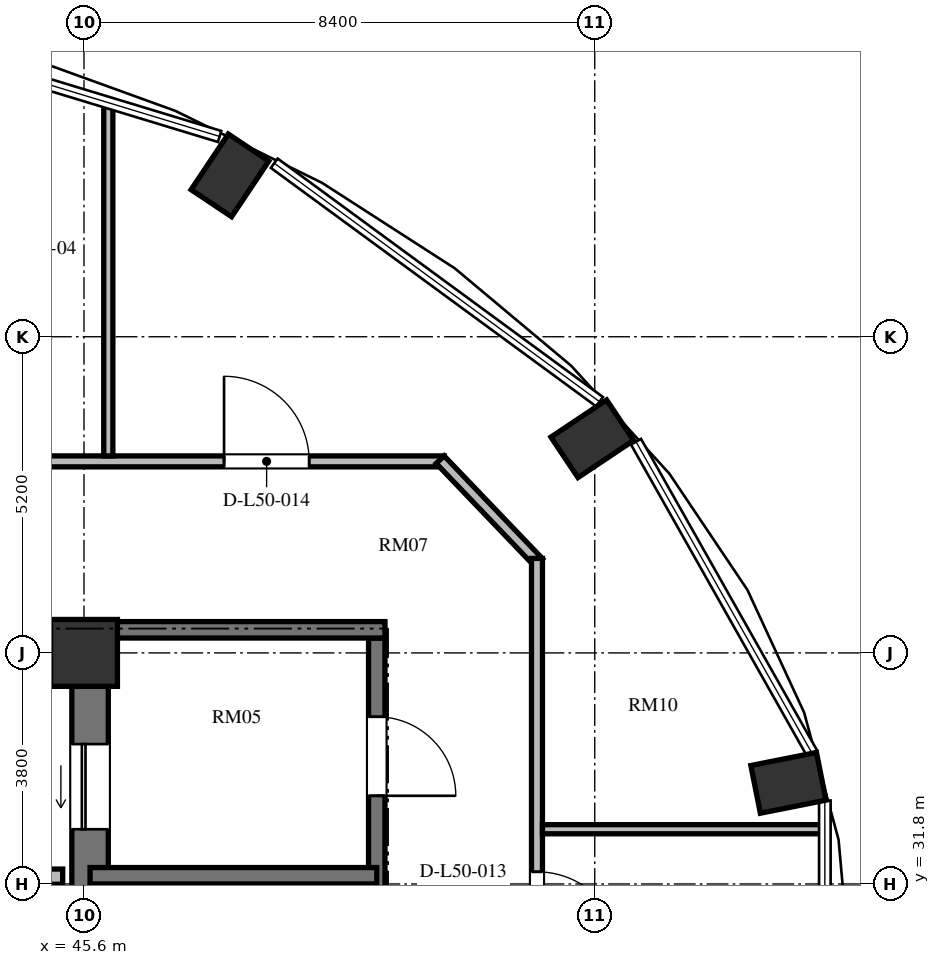
"""IFC4 building model, lengths in metres.
Left out: names, types, materials, properties, quantities, classifications, styles, units other than length and angle.
Written with IfcOpenShell. Run it as: python <this file> out.ifc"""

import sys

from ifc_helpers import new_model, si_unit, direction, frame, frame_2d, origin, origin_2d, place, context, subcontext, project, spatial, rectangle, extrude, element, fill, save


model = new_model("IFC4")
c1 = context("Model", 3, precision=1e-05, world=origin(), true_north=direction((0.0, 1.0)))
c2 = subcontext(c1, "Body", "Model", "MODEL_VIEW")
j1 = project(units=[si_unit("LENGTHUNIT", "METRE"), si_unit("PLANEANGLEUNIT", "RADIAN")], contexts=[c1])
p1 = place(None, origin())
s1 = spatial("IfcSite", under=j1, at=p1, CompositionType="ELEMENT")
p2 = place(p1, origin())
s2 = spatial("IfcBuilding", under=s1, at=p2, CompositionType="ELEMENT")
p3 = place(p2, frame((0.0, 0.0, 194.832)))
s3 = spatial("IfcBuildingStorey", under=s2, at=p3, CompositionType="ELEMENT", Elevation=194.832)
for number, where, z_axis, x_axis in (
    (1, (57.185, 33.463, 0.0), (0.0, 0.0, 1.0), (0.981, 0.195, 0.0)),
    (2, (53.96, 39.123, 0.0), (0.0, 0.0, 1.0), (0.831, 0.556, 0.0)),
    (3, (48.0, 43.454, 0.0), (0.0, 0.0, 1.0), (0.556, 0.831, 0.0)),
):
    element("IfcColumn", number, at=place(p3, frame(where, z_axis=z_axis, x_axis=x_axis)), inside=s3, PredefinedType="COLUMN", context=c2, shape_type="SweptSolid", body=[
        extrude(rectangle(XDim=1.1, YDim=0.8, at=origin_2d()), origin(), (0.0, 0.0, 1.0), 3.648),
    ])
p4 = place(p3, frame((45.6, 35.6, 0.0), z_axis=(0.0, 0.0, 1.0), x_axis=(1.0, 0.0, 0.0)))
e4 = element("IfcColumn", 4, at=p4, inside=s3, PredefinedType="COLUMN", context=c2, shape_type="SweptSolid", body=[
    extrude(rectangle(XDim=1.1, YDim=1.1, at=origin_2d()), origin(), (0.0, 0.0, 1.0), 3.648),
])
p5 = place(p3, frame((45.7, 20.95, 0.0), z_axis=(0.0, 0.0, 1.0), x_axis=(0.0, 1.0, 0.0)))
e5 = element("IfcWall", 5, at=p5, inside=s3, PredefinedType="SHEAR", context=c2, shape_type="SweptSolid", body=[
    extrude(rectangle(XDim=14.1, YDim=0.6, at=frame_2d((7.05, 0.0))), origin(), (0.0, 0.0, 1.0), 3.648),
])
p6 = place(p5, frame((11.75, 0.0, 0.0)))
e6 = element("IfcOpeningElement", 6, at=p6, cuts=e5, PredefinedType="OPENING", context=c2, shape_type="SweptSolid", body=[
    extrude(rectangle(XDim=1.4, YDim=2.3, at=frame_2d((0.7, 1.15))), frame((0.0, 0.31, 0.0), z_axis=(0.0, -1.0, 0.0), x_axis=(1.0, 0.0, 0.0)), (0.0, 0.0, 1.0), 0.62),
])
p7 = place(p5, frame((0.95, 0.0, 0.0)))
e7 = element("IfcOpeningElement", 7, at=p7, cuts=e5, PredefinedType="OPENING", context=c2, shape_type="SweptSolid", body=[
    extrude(rectangle(XDim=1.4, YDim=2.3, at=frame_2d((0.7, 1.15))), frame((0.0, 0.31, 0.0), z_axis=(0.0, -1.0, 0.0), x_axis=(1.0, 0.0, 0.0)), (0.0, 0.0, 1.0), 0.62),
])
p8 = place(p3, frame((42.95, 31.92, 0.0), z_axis=(0.0, 0.0, 1.0), x_axis=(1.0, 0.0, 0.0)))
e8 = element("IfcWall", 8, at=p8, inside=s3, PredefinedType="SOLIDWALL", context=c2, shape_type="SweptSolid", body=[
    extrude(rectangle(XDim=2.3, YDim=0.25, at=frame_2d((1.15, 0.0))), origin(), (0.0, 0.0, 1.0), 3.448),
])
p9 = place(p3, frame((50.415, 35.845, 0.0), z_axis=(0.0, 0.0, 1.0), x_axis=(0.0, -1.0, 0.0)))
e9 = element("IfcWall", 9, at=p9, inside=s3, PredefinedType="SHEAR", context=c2, shape_type="SweptSolid", body=[
    extrude(rectangle(XDim=15.825, YDim=0.27, at=frame_2d((7.913, 0.0))), origin(), (0.0, 0.0, 1.0), 3.648),
])
p10 = place(p9, frame((4.445, 0.0, 0.0)))
e10 = element("IfcOpeningElement", 10, at=p10, cuts=e9, PredefinedType="OPENING", context=c2, shape_type="SweptSolid", body=[
    extrude(rectangle(XDim=1.2, YDim=2.15, at=frame_2d((0.6, 1.075))), frame((0.0, 0.145, 0.0), z_axis=(0.0, -1.0, 0.0), x_axis=(1.0, 0.0, 0.0)), (0.0, 0.0, 1.0), 0.29),
])
p11 = place(p9, frame((1.295, 0.0, 0.0)))
e11 = element("IfcOpeningElement", 11, at=p11, cuts=e9, PredefinedType="OPENING", context=c2, shape_type="SweptSolid", body=[
    extrude(rectangle(XDim=1.3, YDim=2.2, at=frame_2d((0.65, 1.1))), frame((0.0, 0.145, 0.0), z_axis=(0.0, -1.0, 0.0), x_axis=(1.0, 0.0, 0.0)), (0.0, 0.0, 1.0), 0.29),
])
p12 = place(p9, frame((13.095, 0.0, 0.0)))
e12 = element("IfcOpeningElement", 12, at=p12, cuts=e9, PredefinedType="OPENING", context=c2, shape_type="SweptSolid", body=[
    extrude(rectangle(XDim=1.3, YDim=2.2, at=frame_2d((0.65, 1.1))), frame((0.0, 0.145, 0.0), z_axis=(0.0, -1.0, 0.0), x_axis=(1.0, 0.0, 0.0)), (0.0, 0.0, 1.0), 0.29),
])
p13 = place(p3, frame((46.0, 35.98, 0.0), z_axis=(0.0, 0.0, 1.0), x_axis=(1.0, 0.0, 0.0)))
e13 = element("IfcWall", 13, at=p13, inside=s3, PredefinedType="SHEAR", context=c2, shape_type="SweptSolid", body=[
    extrude(rectangle(XDim=4.55, YDim=0.27, at=frame_2d((2.275, 0.0))), origin(), (0.0, 0.0, 1.0), 3.648),
])
p14 = place(p3, frame((45.7, 31.935, 0.0), z_axis=(0.0, 0.0, 1.0), x_axis=(1.0, 0.0, 0.0)))
e14 = element("IfcWall", 14, at=p14, inside=s3, PredefinedType="SHEAR", context=c2, shape_type="SweptSolid", body=[
    extrude(rectangle(XDim=4.715, YDim=0.27, at=frame_2d((2.357, 0.0))), origin(), (0.0, 0.0, 1.0), 3.648),
])
p15 = place(p3, frame((30.71, 38.75, 0.0), z_axis=(0.0, 0.0, 1.0), x_axis=(1.0, 0.0, 0.0)))
e15 = element("IfcWall", 15, at=p15, inside=s3, PredefinedType="PARTITIONING", context=c2, shape_type="SweptSolid", body=[
    extrude(rectangle(XDim=20.815, YDim=0.18, at=frame_2d((10.408, 0.0))), origin(), (0.0, 0.0, 1.0), 3.073),
])
p16 = place(p15, frame((17.194, 0.0, 0.0)))
e16 = element("IfcOpeningElement", 16, at=p16, cuts=e15, PredefinedType="OPENING", context=c2, shape_type="SweptSolid", body=[
    extrude(rectangle(XDim=1.4, YDim=2.2, at=frame_2d((0.7, 1.1))), frame((0.0, 0.1, 0.0), z_axis=(0.0, -1.0, 0.0), x_axis=(1.0, 0.0, 0.0)), (0.0, 0.0, 1.0), 0.2),
])
p17 = place(p15, frame((12.59, 0.0, 0.0)))
e17 = element("IfcOpeningElement", 17, at=p17, cuts=e15, PredefinedType="OPENING", context=c2, shape_type="SweptSolid", body=[
    extrude(rectangle(XDim=1.4, YDim=2.2, at=frame_2d((0.7, 1.1))), frame((0.0, 0.1, 0.0), z_axis=(0.0, -1.0, 0.0), x_axis=(1.0, 0.0, 0.0)), (0.0, 0.0, 1.0), 0.2),
])
p18 = place(p15, frame((8.59, 0.0, 0.0)))
e18 = element("IfcOpeningElement", 18, at=p18, cuts=e15, PredefinedType="OPENING", context=c2, shape_type="SweptSolid", body=[
    extrude(rectangle(XDim=1.4, YDim=2.2, at=frame_2d((0.7, 1.1))), frame((0.0, 0.1, 0.0), z_axis=(0.0, -1.0, 0.0), x_axis=(1.0, 0.0, 0.0)), (0.0, 0.0, 1.0), 0.2),
])
p19 = place(p15, frame((4.59, 0.0, 0.0)))
e19 = element("IfcOpeningElement", 19, at=p19, cuts=e15, PredefinedType="OPENING", context=c2, shape_type="SweptSolid", body=[
    extrude(rectangle(XDim=1.4, YDim=2.2, at=frame_2d((0.7, 1.1))), frame((0.0, 0.1, 0.0), z_axis=(0.0, -1.0, 0.0), x_axis=(1.0, 0.0, 0.0)), (0.0, 0.0, 1.0), 0.2),
])
p20 = place(p15, frame((1.104, 0.0, 0.0)))
e20 = element("IfcOpeningElement", 20, at=p20, cuts=e15, PredefinedType="OPENING", context=c2, shape_type="SweptSolid", body=[
    extrude(rectangle(XDim=1.4, YDim=2.2, at=frame_2d((0.7, 1.1))), frame((0.0, 0.1, 0.0), z_axis=(0.0, -1.0, 0.0), x_axis=(1.0, 0.0, 0.0)), (0.0, 0.0, 1.0), 0.2),
])
p21 = place(p3, frame((51.458, 38.779, 0.0), z_axis=(0.0, 0.0, 1.0), x_axis=(0.691359830363, -0.722510612352, 0.0)))
e21 = element("IfcWall", 21, at=p21, inside=s3, PredefinedType="PARTITIONING", context=c2, shape_type="SweptSolid", body=[
    extrude(rectangle(XDim=2.343, YDim=0.18, at=frame_2d((1.172, 0.0))), origin(), (0.0, 0.0, 1.0), 3.033),
])
p22 = place(p3, frame((53.05, 37.155, 0.0), z_axis=(0.0, 0.0, 1.0), x_axis=(0.0, -1.0, 0.0)))
e22 = element("IfcWall", 22, at=p22, inside=s3, PredefinedType="PARTITIONING", context=c2, shape_type="SweptSolid", body=[
    extrude(rectangle(XDim=13.509, YDim=0.18, at=frame_2d((6.754, 0.0))), origin(), (0.0, 0.0, 1.0), 3.448),
])
p23 = place(p22, frame((10.758, 0.0, 0.0)))
e23 = element("IfcOpeningElement", 23, at=p23, cuts=e22, PredefinedType="OPENING", context=c2, shape_type="SweptSolid", body=[
    extrude(rectangle(XDim=1.4, YDim=2.2, at=frame_2d((0.7, 1.1))), frame((0.0, 0.1, 0.0), z_axis=(0.0, -1.0, 0.0), x_axis=(1.0, 0.0, 0.0)), (0.0, 0.0, 1.0), 0.2),
])
p24 = place(p22, frame((8.133, 0.0, 0.0)))
e24 = element("IfcOpeningElement", 24, at=p24, cuts=e22, PredefinedType="OPENING", context=c2, shape_type="SweptSolid", body=[
    extrude(rectangle(XDim=1.05, YDim=2.15, at=frame_2d((0.525, 1.075))), frame((0.0, 0.1, 0.0), z_axis=(0.0, -1.0, 0.0), x_axis=(1.0, 0.0, 0.0)), (0.0, 0.0, 1.0), 0.2),
])
p25 = place(p22, frame((5.155, 0.0, 0.0)))
e25 = element("IfcOpeningElement", 25, at=p25, cuts=e22, PredefinedType="OPENING", context=c2, shape_type="SweptSolid", body=[
    extrude(rectangle(XDim=1.4, YDim=2.2, at=frame_2d((0.7, 1.1))), frame((0.0, 0.1, 0.0), z_axis=(0.0, -1.0, 0.0), x_axis=(1.0, 0.0, 0.0)), (0.0, 0.0, 1.0), 0.2),
])
p26 = place(p3, frame((53.14, 32.7, 0.0), z_axis=(0.0, 0.0, 1.0), x_axis=(1.0, 0.0, 0.0)))
e26 = element("IfcWall", 26, at=p26, inside=s3, PredefinedType="PARTITIONING", context=c2, shape_type="SweptSolid", body=[
    extrude(rectangle(XDim=4.632, YDim=0.15, at=frame_2d((2.316, 0.0))), origin(), (0.0, 0.0, 1.0), 3.448),
])
p27 = place(p3, frame((46.0, 38.84, 0.0), z_axis=(0.0, 0.0, 1.0), x_axis=(0.0, 1.0, 0.0)))
e27 = element("IfcWall", 27, at=p27, inside=s3, PredefinedType="PARTITIONING", context=c2, shape_type="SweptSolid", body=[
    extrude(rectangle(XDim=5.793, YDim=0.15, at=frame_2d((2.896, 0.0))), origin(), (0.0, 0.0, 1.0), 3.448),
])
p28 = place(p6, origin())
e28 = element("IfcDoor", 28, at=p28, inside=s3, OperationType="SLIDING_TO_LEFT", PredefinedType="DOOR", context=c2, shape_type="SweptSolid", body=[
    extrude(rectangle(XDim=1.4, YDim=2.3, at=frame_2d((0.7, 1.15))), frame((0.0, 0.025, 0.0), z_axis=(0.0, -1.0, 0.0), x_axis=(1.0, 0.0, 0.0)), (0.0, 0.0, 1.0), 0.05),
])
fill(e6, e28)
p29 = place(p11, origin())
e29 = element("IfcDoor", 29, at=p29, inside=s3, OperationType="SINGLE_SWING_RIGHT", PredefinedType="DOOR", context=c2, shape_type="SweptSolid", body=[
    extrude(rectangle(XDim=1.3, YDim=2.2, at=frame_2d((0.65, 1.1))), frame((0.0, 0.025, 0.0), z_axis=(0.0, -1.0, 0.0), x_axis=(1.0, 0.0, 0.0)), (0.0, 0.0, 1.0), 0.05),
])
fill(e11, e29)
p30 = place(p25, origin())
e30 = element("IfcDoor", 30, at=p30, inside=s3, OperationType="SINGLE_SWING_RIGHT", PredefinedType="DOOR", context=c2, shape_type="SweptSolid", body=[
    extrude(rectangle(XDim=1.4, YDim=2.2, at=frame_2d((0.7, 1.1))), frame((0.0, 0.025, 0.0), z_axis=(0.0, -1.0, 0.0), x_axis=(1.0, 0.0, 0.0)), (0.0, 0.0, 1.0), 0.05),
])
fill(e25, e30)
p31 = place(p16, origin())
e31 = element("IfcDoor", 31, at=p31, inside=s3, OperationType="SINGLE_SWING_LEFT", PredefinedType="DOOR", context=c2, shape_type="SweptSolid", body=[
    extrude(rectangle(XDim=1.4, YDim=2.2, at=frame_2d((0.7, 1.1))), frame((0.0, 0.025, 0.0), z_axis=(0.0, -1.0, 0.0), x_axis=(1.0, 0.0, 0.0)), (0.0, 0.0, 1.0), 0.05),
])
fill(e16, e31)
save(model, sys.argv[1])
